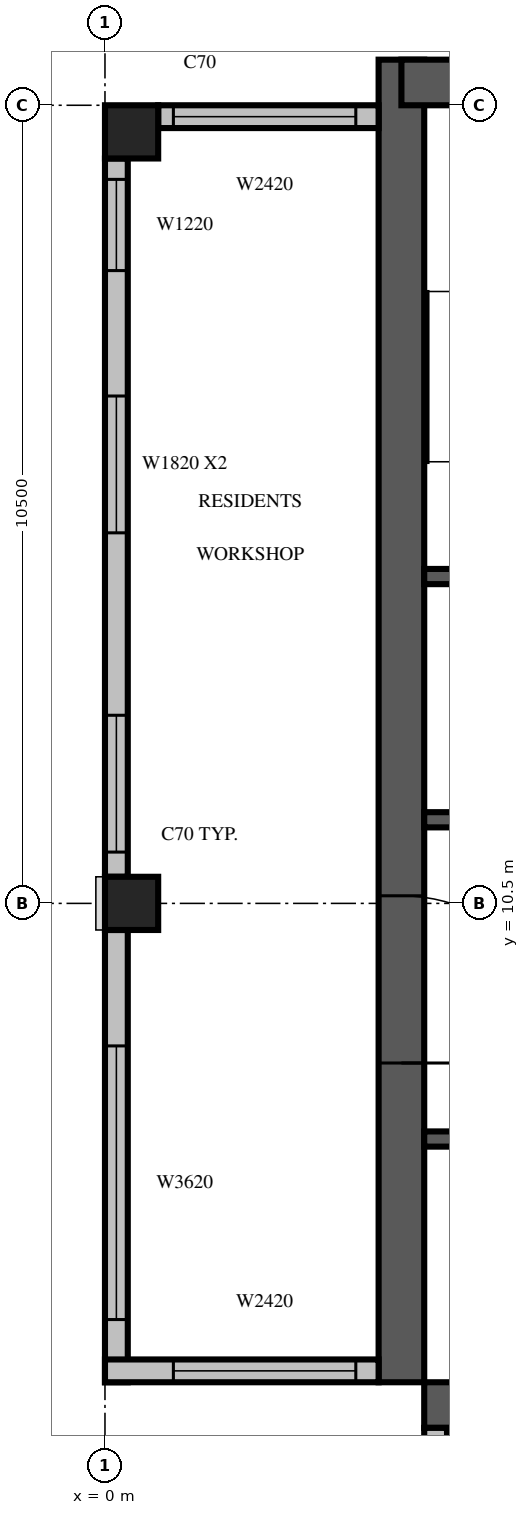
"""IFC4 building model, lengths in metres.
Left out: names, types, materials, properties, quantities, classifications, styles, units other than length and angle.
Written with IfcOpenShell. Run it as: python <this file> out.ifc"""

import sys

from ifc_helpers import new_model, si_unit, direction, frame, frame_2d, origin, origin_2d, place, context, subcontext, project, spatial, rectangle, extrude, source, transform, mapped, element, fill, save


model = new_model("IFC4")
c1 = context("Model", 3, precision=1e-05, world=origin(), true_north=direction((0.0, 1.0)))
c2 = subcontext(c1, "Body", "Model", "MODEL_VIEW")
j1 = project(units=[si_unit("LENGTHUNIT", "METRE"), si_unit("PLANEANGLEUNIT", "RADIAN")], contexts=[c1])
p1 = place(None, origin())
s1 = spatial("IfcSite", under=j1, at=p1, CompositionType="ELEMENT")
p2 = place(p1, origin())
s2 = spatial("IfcBuilding", under=s1, at=p2, CompositionType="ELEMENT")
p3 = place(p2, frame((0.0, 0.0, 323.0)))
s3 = spatial("IfcBuildingStorey", under=s2, at=p3, CompositionType="ELEMENT", Elevation=323.0)
m1 = source(origin(), c2, "Body", "SweptSolid", [
    extrude(rectangle(XDim=0.7, YDim=0.7, at=origin_2d()), origin(), (0.0, 0.0, 1.0), 3.5),
])
for number, where, z_axis, x_axis in (
    (1, (0.35, 10.5, 0.0), (0.0, 0.0, 1.0), (1.0, 0.0, 0.0)),
    (2, (0.35, 20.65, 0.0), (0.0, 0.0, 1.0), (1.0, 0.0, 0.0)),
):
    element("IfcColumn", number, at=place(p3, frame(where, z_axis=z_axis, x_axis=x_axis)), inside=s3, PredefinedType="COLUMN", context=c2, shape_type="MappedRepresentation", body=[
        mapped(m1, transform((0.0, 0.0, 0.0), scale=1.0)),
    ])
m2 = source(origin(), c2, "Body", "SweptSolid", [
    extrude(rectangle(XDim=17.4, YDim=0.6, at=frame_2d((8.7, 0.0))), origin(), (0.0, 0.0, 1.0), 3.5),
])
p4 = place(p3, frame((3.9, 4.2, 0.0), z_axis=(0.0, 0.0, 1.0), x_axis=(0.0, 1.0, 0.0)))
e3 = element("IfcWall", 3, at=p4, inside=s3, PredefinedType="SHEAR", context=c2, shape_type="MappedRepresentation", body=[
    mapped(m2, transform((0.0, 0.0, 0.0), scale=1.0)),
])
m3 = source(origin(), c2, "Body", "SweptSolid", [
    extrude(rectangle(XDim=2.2, YDim=2.1, at=frame_2d((1.1, 1.05))), frame((0.0, 0.31, 0.0), z_axis=(0.0, -1.0, 0.0), x_axis=(1.0, 0.0, 0.0)), (0.0, 0.0, 1.0), 0.62),
])
p5 = place(p4, frame((4.2, 0.0, 0.0)))
e4 = element("IfcOpeningElement", 4, at=p5, cuts=e3, PredefinedType="OPENING", context=c2, shape_type="MappedRepresentation", body=[
    mapped(m3, transform((0.0, 0.0, 0.0), scale=1.0)),
])
p6 = place(p3, frame((4.2, 3.9, 0.0), z_axis=(0.0, 0.0, 1.0), x_axis=(1.0, 0.0, 0.0)))
e5 = element("IfcWall", 5, at=p6, inside=s3, PredefinedType="SHEAR", context=c2, shape_type="MappedRepresentation", body=[
    mapped(m2, transform((0.0, 0.0, 0.0), scale=1.0)),
])
m4 = source(origin(), c2, "Body", "SweptSolid", [
    extrude(rectangle(XDim=0.9, YDim=2.1, at=frame_2d((0.45, 1.05))), frame((0.0, 0.31, 0.0), z_axis=(0.0, -1.0, 0.0), x_axis=(1.0, 0.0, 0.0)), (0.0, 0.0, 1.0), 0.62),
])
p7 = place(p6, frame((15.2, 0.0, 0.0)))
e6 = element("IfcOpeningElement", 6, at=p7, cuts=e5, PredefinedType="OPENING", context=c2, shape_type="MappedRepresentation", body=[
    mapped(m4, transform((0.0, 0.0, 0.0), scale=1.0)),
])
m5 = source(origin(), c2, "Body", "SweptSolid", [
    extrude(rectangle(XDim=6.6, YDim=0.6, at=frame_2d((3.3, 0.0))), origin(), (0.0, 0.0, 1.0), 3.5),
])
p8 = place(p3, frame((3.9, 21.3, 0.0), z_axis=(0.0, 0.0, 1.0), x_axis=(1.0, 0.0, 0.0)))
e7 = element("IfcWall", 7, at=p8, inside=s3, PredefinedType="SHEAR", context=c2, shape_type="MappedRepresentation", body=[
    mapped(m5, transform((0.0, 0.0, 0.0), scale=1.0)),
])
m6 = source(origin(), c2, "Body", "SweptSolid", [
    extrude(rectangle(XDim=1.2, YDim=2.4, at=frame_2d((0.6, 1.2))), frame((0.0, 0.31, 0.0), z_axis=(0.0, -1.0, 0.0), x_axis=(1.0, 0.0, 0.0)), (0.0, 0.0, 1.0), 0.62),
])
p9 = place(p8, frame((1.5, 0.0, 0.6)))
e8 = element("IfcOpeningElement", 8, at=p9, cuts=e7, PredefinedType="OPENING", context=c2, shape_type="MappedRepresentation", body=[
    mapped(m6, transform((0.0, 0.0, 0.0), scale=1.0)),
])
p10 = place(p8, frame((3.6, 0.0, 0.6)))
e9 = element("IfcOpeningElement", 9, at=p10, cuts=e7, PredefinedType="OPENING", context=c2, shape_type="MappedRepresentation", body=[
    mapped(m6, transform((0.0, 0.0, 0.0), scale=1.0)),
])
m7 = source(origin(), c2, "Body", "SweptSolid", [
    extrude(rectangle(XDim=2.9, YDim=0.3, at=frame_2d((1.45, 0.0))), origin(), (0.0, 0.0, 1.0), 3.1),
])
p11 = place(p3, frame((3.6, 20.85, 0.0), z_axis=(0.0, 0.0, 1.0), x_axis=(-1.0, 0.0, 0.0)))
e10 = element("IfcWall", 10, at=p11, inside=s3, PredefinedType="STANDARD", context=c2, shape_type="MappedRepresentation", body=[
    mapped(m7, transform((0.0, 0.0, 0.0), scale=1.0)),
])
m8 = source(origin(), c2, "Body", "SweptSolid", [
    extrude(rectangle(XDim=2.4, YDim=2.0, at=frame_2d((1.2, 1.0))), frame((0.0, 0.16, 0.0), z_axis=(0.0, -1.0, 0.0), x_axis=(1.0, 0.0, 0.0)), (0.0, 0.0, 1.0), 0.32),
])
p12 = place(p11, frame((0.3, 0.0, 0.6)))
e11 = element("IfcOpeningElement", 11, at=p12, cuts=e10, PredefinedType="OPENING", context=c2, shape_type="MappedRepresentation", body=[
    mapped(m8, transform((0.0, 0.0, 0.0), scale=1.0)),
])
m9 = source(origin(), c2, "Body", "SweptSolid", [
    extrude(rectangle(XDim=9.45, YDim=0.3, at=frame_2d((4.725, 0.0))), origin(), (0.0, 0.0, 1.0), 3.1),
])
p13 = place(p3, frame((0.15, 20.3, 0.0), z_axis=(0.0, 0.0, 1.0), x_axis=(0.0, -1.0, 0.0)))
e12 = element("IfcWall", 12, at=p13, inside=s3, PredefinedType="STANDARD", context=c2, shape_type="MappedRepresentation", body=[
    mapped(m9, transform((0.0, 0.0, 0.0), scale=1.0)),
])
m10 = source(origin(), c2, "Body", "SweptSolid", [
    extrude(rectangle(XDim=1.2, YDim=2.0, at=frame_2d((0.6, 1.0))), frame((0.0, 0.16, 0.0), z_axis=(0.0, -1.0, 0.0), x_axis=(1.0, 0.0, 0.0)), (0.0, 0.0, 1.0), 0.32),
])
p14 = place(p13, frame((0.275, 0.0, 0.6)))
e13 = element("IfcOpeningElement", 13, at=p14, cuts=e12, PredefinedType="OPENING", context=c2, shape_type="MappedRepresentation", body=[
    mapped(m10, transform((0.0, 0.0, 0.0), scale=1.0)),
])
m11 = source(origin(), c2, "Body", "SweptSolid", [
    extrude(rectangle(XDim=1.8, YDim=2.0, at=frame_2d((0.9, 1.0))), frame((0.0, 0.16, 0.0), z_axis=(0.0, -1.0, 0.0), x_axis=(1.0, 0.0, 0.0)), (0.0, 0.0, 1.0), 0.32),
])
p15 = place(p13, frame((3.125, 0.0, 0.6)))
e14 = element("IfcOpeningElement", 14, at=p15, cuts=e12, PredefinedType="OPENING", context=c2, shape_type="MappedRepresentation", body=[
    mapped(m11, transform((0.0, 0.0, 0.0), scale=1.0)),
])
p16 = place(p13, frame((7.325, 0.0, 0.6)))
e15 = element("IfcOpeningElement", 15, at=p16, cuts=e12, PredefinedType="OPENING", context=c2, shape_type="MappedRepresentation", body=[
    mapped(m11, transform((0.0, 0.0, 0.0), scale=1.0)),
])
m12 = source(origin(), c2, "Body", "SweptSolid", [
    extrude(rectangle(XDim=5.95, YDim=0.3, at=frame_2d((2.975, 0.0))), origin(), (0.0, 0.0, 1.0), 3.1),
])
p17 = place(p3, frame((0.15, 10.15, 0.0), z_axis=(0.0, 0.0, 1.0), x_axis=(0.0, -1.0, 0.0)))
e16 = element("IfcWall", 16, at=p17, inside=s3, PredefinedType="STANDARD", context=c2, shape_type="MappedRepresentation", body=[
    mapped(m12, transform((0.0, 0.0, 0.0), scale=1.0)),
])
m13 = source(origin(), c2, "Body", "SweptSolid", [
    extrude(rectangle(XDim=3.6, YDim=2.0, at=frame_2d((1.8, 1.0))), frame((0.0, 0.16, 0.0), z_axis=(0.0, -1.0, 0.0), x_axis=(1.0, 0.0, 0.0)), (0.0, 0.0, 1.0), 0.32),
])
p18 = place(p17, frame((1.525, 0.0, 0.6)))
e17 = element("IfcOpeningElement", 17, at=p18, cuts=e16, PredefinedType="OPENING", context=c2, shape_type="MappedRepresentation", body=[
    mapped(m13, transform((0.0, 0.0, 0.0), scale=1.0)),
])
m14 = source(origin(), c2, "Body", "SweptSolid", [
    extrude(rectangle(XDim=3.6, YDim=0.3, at=frame_2d((1.8, 0.0))), origin(), (0.0, 0.0, 1.0), 3.1),
])
p19 = place(p3, frame((0.0, 4.35, 0.0), z_axis=(0.0, 0.0, 1.0), x_axis=(1.0, 0.0, 0.0)))
e18 = element("IfcWall", 18, at=p19, inside=s3, PredefinedType="STANDARD", context=c2, shape_type="MappedRepresentation", body=[
    mapped(m14, transform((0.0, 0.0, 0.0), scale=1.0)),
])
p20 = place(p19, frame((0.9, 0.0, 0.6)))
e19 = element("IfcOpeningElement", 19, at=p20, cuts=e18, PredefinedType="OPENING", context=c2, shape_type="MappedRepresentation", body=[
    mapped(m8, transform((0.0, 0.0, 0.0), scale=1.0)),
])
p21 = place(p3, frame((4.35, 3.6, 0.0), z_axis=(0.0, 0.0, 1.0), x_axis=(0.0, -1.0, 0.0)))
e20 = element("IfcWall", 20, at=p21, inside=s3, PredefinedType="STANDARD", context=c2, shape_type="MappedRepresentation", body=[
    mapped(m14, transform((0.0, 0.0, 0.0), scale=1.0)),
])
p22 = place(p21, frame((0.3, 0.0, 0.6)))
e21 = element("IfcOpeningElement", 21, at=p22, cuts=e20, PredefinedType="OPENING", context=c2, shape_type="MappedRepresentation", body=[
    mapped(m8, transform((0.0, 0.0, 0.0), scale=1.0)),
])
m15 = source(origin(), c2, "Body", "SweptSolid", [
    extrude(rectangle(XDim=9.6, YDim=0.2, at=frame_2d((4.8, 0.0))), origin(), (0.0, 0.0, 1.0), 3.5),
])
p23 = place(p3, frame((4.2, 7.4, 0.0), z_axis=(0.0, 0.0, 1.0), x_axis=(1.0, 0.0, 0.0)))
e22 = element("IfcWall", 22, at=p23, inside=s3, PredefinedType="SOLIDWALL", context=c2, shape_type="MappedRepresentation", body=[
    mapped(m15, transform((0.0, 0.0, 0.0), scale=1.0)),
])
m16 = source(origin(), c2, "Body", "SweptSolid", [
    extrude(rectangle(XDim=1.1, YDim=2.1, at=frame_2d((0.55, 1.05))), frame((0.0, 0.11, 0.0), z_axis=(0.0, -1.0, 0.0), x_axis=(1.0, 0.0, 0.0)), (0.0, 0.0, 1.0), 0.22),
])
p24 = place(p23, frame((0.65, 0.0, 0.0)))
e23 = element("IfcOpeningElement", 23, at=p24, cuts=e22, PredefinedType="OPENING", context=c2, shape_type="MappedRepresentation", body=[
    mapped(m16, transform((0.0, 0.0, 0.0), scale=1.0)),
])
p25 = place(p23, frame((3.05, 0.0, 0.0)))
e24 = element("IfcOpeningElement", 24, at=p25, cuts=e22, PredefinedType="OPENING", context=c2, shape_type="MappedRepresentation", body=[
    mapped(m16, transform((0.0, 0.0, 0.0), scale=1.0)),
])
p26 = place(p23, frame((5.45, 0.0, 0.0)))
e25 = element("IfcOpeningElement", 25, at=p26, cuts=e22, PredefinedType="OPENING", context=c2, shape_type="MappedRepresentation", body=[
    mapped(m16, transform((0.0, 0.0, 0.0), scale=1.0)),
])
p27 = place(p23, frame((7.85, 0.0, 0.0)))
e26 = element("IfcOpeningElement", 26, at=p27, cuts=e22, PredefinedType="OPENING", context=c2, shape_type="MappedRepresentation", body=[
    mapped(m16, transform((0.0, 0.0, 0.0), scale=1.0)),
])
m17 = source(origin(), c2, "Body", "SweptSolid", [
    extrude(rectangle(XDim=4.8, YDim=0.2, at=frame_2d((2.4, 0.0))), origin(), (0.0, 0.0, 1.0), 3.5),
])
p28 = place(p3, frame((4.2, 11.6, 0.0), z_axis=(0.0, 0.0, 1.0), x_axis=(1.0, 0.0, 0.0)))
e27 = element("IfcWall", 27, at=p28, inside=s3, PredefinedType="SOLIDWALL", context=c2, shape_type="MappedRepresentation", body=[
    mapped(m17, transform((0.0, 0.0, 0.0), scale=1.0)),
])
p29 = place(p28, frame((0.65, 0.0, 0.0)))
e28 = element("IfcOpeningElement", 28, at=p29, cuts=e27, PredefinedType="OPENING", context=c2, shape_type="MappedRepresentation", body=[
    mapped(m16, transform((0.0, 0.0, 0.0), scale=1.0)),
])
p30 = place(p28, frame((3.05, 0.0, 0.0)))
e29 = element("IfcOpeningElement", 29, at=p30, cuts=e27, PredefinedType="OPENING", context=c2, shape_type="MappedRepresentation", body=[
    mapped(m16, transform((0.0, 0.0, 0.0), scale=1.0)),
])
p31 = place(p3, frame((4.2, 14.8, 0.0), z_axis=(0.0, 0.0, 1.0), x_axis=(1.0, 0.0, 0.0)))
e30 = element("IfcWall", 30, at=p31, inside=s3, PredefinedType="SOLIDWALL", context=c2, shape_type="MappedRepresentation", body=[
    mapped(m17, transform((0.0, 0.0, 0.0), scale=1.0)),
])
m18 = source(origin(), c2, "Body", "SweptSolid", [
    extrude(rectangle(XDim=2.4, YDim=2.0, at=frame_2d((1.2, 1.0))), frame((0.0, 0.03, 0.0), z_axis=(0.0, -1.0, 0.0), x_axis=(1.0, 0.0, 0.0)), (0.0, 0.0, 1.0), 0.06),
])
p32 = place(p12, origin())
e31 = element("IfcWindow", 31, at=p32, inside=s3, PartitioningType="SINGLE_PANEL", PredefinedType="WINDOW", context=c2, shape_type="MappedRepresentation", body=[
    mapped(m18, transform((0.0, 0.0, 0.0), scale=1.0)),
])
fill(e11, e31)
m19 = source(origin(), c2, "Body", "SweptSolid", [
    extrude(rectangle(XDim=1.2, YDim=2.0, at=frame_2d((0.6, 1.0))), frame((0.0, 0.03, 0.0), z_axis=(0.0, -1.0, 0.0), x_axis=(1.0, 0.0, 0.0)), (0.0, 0.0, 1.0), 0.06),
])
p33 = place(p14, origin())
e32 = element("IfcWindow", 32, at=p33, inside=s3, PartitioningType="SINGLE_PANEL", PredefinedType="WINDOW", context=c2, shape_type="MappedRepresentation", body=[
    mapped(m19, transform((0.0, 0.0, 0.0), scale=1.0)),
])
fill(e13, e32)
m20 = source(origin(), c2, "Body", "SweptSolid", [
    extrude(rectangle(XDim=1.8, YDim=2.0, at=frame_2d((0.9, 1.0))), frame((0.0, 0.03, 0.0), z_axis=(0.0, -1.0, 0.0), x_axis=(1.0, 0.0, 0.0)), (0.0, 0.0, 1.0), 0.06),
])
p34 = place(p15, origin())
e33 = element("IfcWindow", 33, at=p34, inside=s3, PartitioningType="SINGLE_PANEL", PredefinedType="WINDOW", context=c2, shape_type="MappedRepresentation", body=[
    mapped(m20, transform((0.0, 0.0, 0.0), scale=1.0)),
])
fill(e14, e33)
p35 = place(p16, origin())
e34 = element("IfcWindow", 34, at=p35, inside=s3, PartitioningType="SINGLE_PANEL", PredefinedType="WINDOW", context=c2, shape_type="MappedRepresentation", body=[
    mapped(m20, transform((0.0, 0.0, 0.0), scale=1.0)),
])
fill(e15, e34)
m21 = source(origin(), c2, "Body", "SweptSolid", [
    extrude(rectangle(XDim=3.6, YDim=2.0, at=frame_2d((1.8, 1.0))), frame((0.0, 0.03, 0.0), z_axis=(0.0, -1.0, 0.0), x_axis=(1.0, 0.0, 0.0)), (0.0, 0.0, 1.0), 0.06),
])
p36 = place(p18, origin())
e35 = element("IfcWindow", 35, at=p36, inside=s3, PartitioningType="SINGLE_PANEL", PredefinedType="WINDOW", context=c2, shape_type="MappedRepresentation", body=[
    mapped(m21, transform((0.0, 0.0, 0.0), scale=1.0)),
])
fill(e17, e35)
p37 = place(p20, origin())
e36 = element("IfcWindow", 36, at=p37, inside=s3, PartitioningType="SINGLE_PANEL", PredefinedType="WINDOW", context=c2, shape_type="MappedRepresentation", body=[
    mapped(m18, transform((0.0, 0.0, 0.0), scale=1.0)),
])
fill(e19, e36)
m22 = source(origin(), c2, "Body", "SweptSolid", [
    extrude(rectangle(XDim=2.2, YDim=2.1, at=frame_2d((1.1, 1.05))), frame((0.0, 0.025, 0.0), z_axis=(0.0, -1.0, 0.0), x_axis=(1.0, 0.0, 0.0)), (0.0, 0.0, 1.0), 0.05),
])
p38 = place(p5, origin())
e37 = element("IfcDoor", 37, at=p38, inside=s3, OperationType="DOUBLE_DOOR_SINGLE_SWING", PredefinedType="DOOR", context=c2, shape_type="MappedRepresentation", body=[
    mapped(m22, transform((0.0, 0.0, 0.0), scale=1.0)),
])
fill(e4, e37)
save(model, sys.argv[1])
